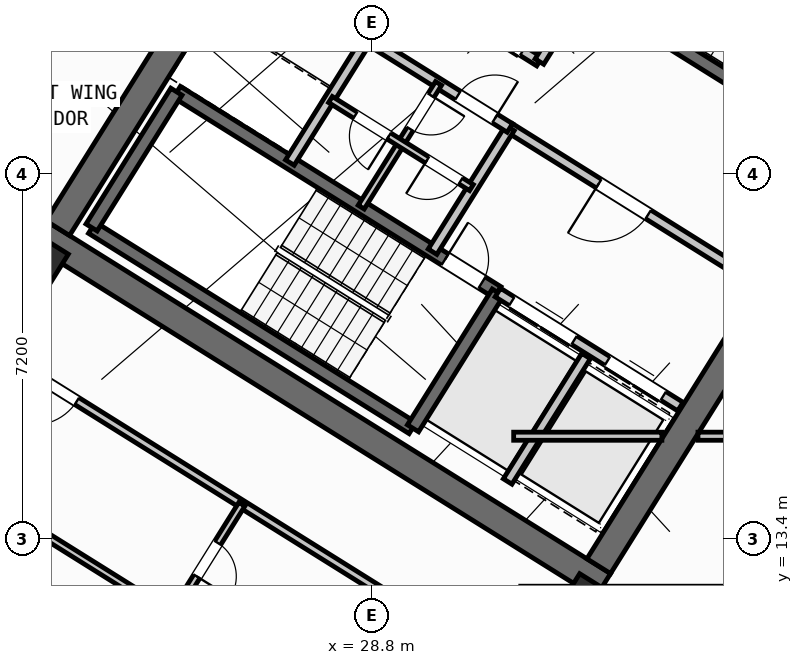
"""IFC4 building model, lengths in metres.
Left out: names, types, materials, properties, quantities, classifications, styles, units other than length and angle.
Written with IfcOpenShell. Run it as: python <this file> out.ifc"""

import sys

from ifc_helpers import new_model, si_unit, direction, frame, frame_2d, origin, origin_2d, place, context, subcontext, project, spatial, rectangle, hollow_rectangle, extrude, source, transform, mapped, element, fill, save


model = new_model("IFC4")
c1 = context("Model", 3, precision=1e-05, world=origin(), true_north=direction((0.0, 1.0)))
c2 = subcontext(c1, "Body", "Model", "MODEL_VIEW")
j1 = project(units=[si_unit("LENGTHUNIT", "METRE"), si_unit("PLANEANGLEUNIT", "RADIAN")], contexts=[c1])
p1 = place(None, origin())
s1 = spatial("IfcSite", under=j1, at=p1, CompositionType="ELEMENT")
p2 = place(p1, origin())
s2 = spatial("IfcBuilding", under=s1, at=p2, CompositionType="ELEMENT")
p3 = place(p2, frame((0.0, 0.0, 158.7)))
s3 = spatial("IfcBuildingStorey", under=s2, at=p3, CompositionType="ELEMENT", Elevation=158.7)
p4 = place(p3, frame((33.366, 12.477, 0.0), z_axis=(0.0, 0.0, 1.0), x_axis=(-0.848047359947, 0.529920442413, 0.0)))
e1 = element("IfcWall", 1, at=p4, inside=s3, PredefinedType="SHEAR", context=c2, shape_type="SweptSolid", body=[
    extrude(rectangle(XDim=13.14, YDim=0.55, at=frame_2d((6.57, 0.0))), origin(), (0.0, 0.0, 1.0), 3.35),
])
p5 = place(p3, frame((36.683, 18.304, 0.0), z_axis=(0.0, 0.0, 1.0), x_axis=(-0.529896466841, -0.848062341122, 0.0)))
e2 = element("IfcWall", 2, at=p5, inside=s3, PredefinedType="SHEAR", context=c2, shape_type="SweptSolid", body=[
    extrude(rectangle(XDim=6.425, YDim=0.55, at=frame_2d((3.212, 0.0))), origin(), (0.0, 0.0, 1.0), 3.35),
])
p6 = place(p3, frame((26.007, 24.976, 0.0), z_axis=(0.0, 0.0, 1.0), x_axis=(-0.529923795287, -0.848045264823, 0.0)))
e3 = element("IfcWall", 3, at=p6, inside=s3, PredefinedType="SHEAR", context=c2, shape_type="SweptSolid", body=[
    extrude(rectangle(XDim=6.425, YDim=0.55, at=frame_2d((3.212, 0.0))), origin(), (0.0, 0.0, 1.0), 3.35),
])
m1 = source(origin(), c2, "Body", "SweptSolid", [
    extrude(hollow_rectangle(XDim=0.9, YDim=0.9, WallThickness=0.036, at=origin_2d()), origin(), (0.0, 0.0, 1.0), 3.6),
])
for number, where, z_axis, x_axis in (
    (4, (33.046, 12.087, 0.0), (0.0, 0.0, 1.0), (-0.848, 0.53, 0.0)),
    (5, (22.191, 18.87, 0.0), (0.0, 0.0, 1.0), (-0.848, 0.53, 0.0)),
):
    element("IfcColumn", number, at=place(p3, frame(where, z_axis=z_axis, x_axis=x_axis)), inside=s3, PredefinedType="COLUMN", context=c2, shape_type="MappedRepresentation", body=[
        mapped(m1, transform((0.0, 0.0, 0.0), scale=1.0)),
    ])
p7 = place(p3, frame((29.268, 6.429, 0.0), z_axis=(0.0, 0.0, 1.0), x_axis=(-0.848049971435, 0.529916263149, 0.0)))
e6 = element("IfcWall", 6, at=p7, inside=s3, PredefinedType="STANDARD", context=c2, shape_type="SweptSolid", body=[
    extrude(rectangle(XDim=31.588, YDim=0.32, at=frame_2d((15.794, 0.0))), origin(), (0.0, 0.0, 1.0), 3.35),
])
p8 = place(p7, frame((16.362, 0.0, 0.0)))
e7 = element("IfcOpeningElement", 7, at=p8, cuts=e6, PredefinedType="OPENING", context=c2, shape_type="SweptSolid", body=[
    extrude(rectangle(XDim=1.2, YDim=2.15, at=frame_2d((0.6, 1.075))), frame((0.0, 0.17, 0.0), z_axis=(0.0, -1.0, 0.0), x_axis=(1.0, 0.0, 0.0)), (0.0, 0.0, 1.0), 0.34),
])
p9 = place(p7, frame((2.989, 0.0, 0.8)))
e8 = element("IfcOpeningElement", 8, at=p9, cuts=e6, PredefinedType="OPENING", context=c2, shape_type="SweptSolid", body=[
    extrude(rectangle(XDim=2.1, YDim=1.55, at=frame_2d((1.05, 0.775))), frame((0.0, 0.17, 0.0), z_axis=(0.0, -1.0, 0.0), x_axis=(1.0, 0.0, 0.0)), (0.0, 0.0, 1.0), 0.34),
])
p10 = place(p7, frame((8.359, 0.0, 0.8)))
e9 = element("IfcOpeningElement", 9, at=p10, cuts=e6, PredefinedType="OPENING", context=c2, shape_type="SweptSolid", body=[
    extrude(rectangle(XDim=2.1, YDim=1.55, at=frame_2d((1.05, 0.775))), frame((0.0, 0.17, 0.0), z_axis=(0.0, -1.0, 0.0), x_axis=(1.0, 0.0, 0.0)), (0.0, 0.0, 1.0), 0.34),
])
p11 = place(p7, frame((13.284, 0.0, 0.95)))
e10 = element("IfcOpeningElement", 10, at=p11, cuts=e6, PredefinedType="OPENING", context=c2, shape_type="SweptSolid", body=[
    extrude(rectangle(XDim=1.2, YDim=1.4, at=frame_2d((0.6, 0.7))), frame((0.0, 0.17, 0.0), z_axis=(0.0, -1.0, 0.0), x_axis=(1.0, 0.0, 0.0)), (0.0, 0.0, 1.0), 0.34),
])
p12 = place(p7, frame((20.259, 0.0, 0.95)))
e11 = element("IfcOpeningElement", 11, at=p12, cuts=e6, PredefinedType="OPENING", context=c2, shape_type="SweptSolid", body=[
    extrude(rectangle(XDim=1.2, YDim=1.4, at=frame_2d((0.6, 0.7))), frame((0.0, 0.17, 0.0), z_axis=(0.0, -1.0, 0.0), x_axis=(1.0, 0.0, 0.0)), (0.0, 0.0, 1.0), 0.34),
])
p13 = place(p7, frame((22.929, 0.0, 0.95)))
e12 = element("IfcOpeningElement", 12, at=p13, cuts=e6, PredefinedType="OPENING", context=c2, shape_type="SweptSolid", body=[
    extrude(rectangle(XDim=1.2, YDim=1.4, at=frame_2d((0.6, 0.7))), frame((0.0, 0.17, 0.0), z_axis=(0.0, -1.0, 0.0), x_axis=(1.0, 0.0, 0.0)), (0.0, 0.0, 1.0), 0.34),
])
p14 = place(p7, frame((27.481, 0.0, 0.8)))
e13 = element("IfcOpeningElement", 13, at=p14, cuts=e6, PredefinedType="OPENING", context=c2, shape_type="SweptSolid", body=[
    extrude(rectangle(XDim=2.1, YDim=1.55, at=frame_2d((1.05, 0.775))), frame((0.0, 0.17, 0.0), z_axis=(0.0, -1.0, 0.0), x_axis=(1.0, 0.0, 0.0)), (0.0, 0.0, 1.0), 0.34),
])
p15 = place(p3, frame((29.605, 15.581, 0.0), z_axis=(0.0, 0.0, 1.0), x_axis=(-0.848036911448, 0.529937163087, 0.0)))
e14 = element("IfcWall", 14, at=p15, inside=s3, PredefinedType="SHEAR", context=c2, shape_type="SweptSolid", body=[
    extrude(rectangle(XDim=7.46, YDim=0.26, at=frame_2d((3.73, 0.0))), origin(), (0.0, 0.0, 1.0), 3.35),
])
p16 = place(p3, frame((31.28, 18.261, 0.0), z_axis=(0.0, 0.0, 1.0), x_axis=(-0.848051618787, 0.529913626805, 0.0)))
e15 = element("IfcWall", 15, at=p16, inside=s3, PredefinedType="SHEAR", context=c2, shape_type="SweptSolid", body=[
    extrude(rectangle(XDim=7.46, YDim=0.26, at=frame_2d((3.73, 0.0))), origin(), (0.0, 0.0, 1.0), 3.35),
])
p17 = place(p16, frame((0.36, 0.0, 0.0)))
e16 = element("IfcOpeningElement", 16, at=p17, cuts=e15, PredefinedType="OPENING", context=c2, shape_type="SweptSolid", body=[
    extrude(rectangle(XDim=0.86, YDim=2.05, at=frame_2d((0.43, 1.025))), frame((0.0, 0.14, 0.0), z_axis=(0.0, -1.0, 0.0), x_axis=(1.0, 0.0, 0.0)), (0.0, 0.0, 1.0), 0.28),
])
p18 = place(p3, frame((31.288, 18.256, 0.0), z_axis=(0.0, 0.0, 1.0), x_axis=(-0.529943379326, -0.848033026897, 0.0)))
e17 = element("IfcWall", 17, at=p18, inside=s3, PredefinedType="SHEAR", context=c2, shape_type="SweptSolid", body=[
    extrude(rectangle(XDim=3.16, YDim=0.26, at=frame_2d((1.58, 0.0))), origin(), (0.0, 0.0, 1.0), 3.35),
])
p19 = place(p3, frame((24.945, 22.22, 0.0), z_axis=(0.0, 0.0, 1.0), x_axis=(-0.529908658664, -0.84805472316, 0.0)))
e18 = element("IfcWall", 18, at=p19, inside=s3, PredefinedType="SHEAR", context=c2, shape_type="SweptSolid", body=[
    extrude(rectangle(XDim=3.16, YDim=0.26, at=frame_2d((1.58, 0.0))), origin(), (0.0, 0.0, 1.0), 3.35),
])
p20 = place(p3, frame((38.046, 21.108, 0.0), z_axis=(0.0, 0.0, 1.0), x_axis=(-0.848054434086, 0.529909121291, 0.0)))
e19 = element("IfcWall", 19, at=p20, inside=s3, PredefinedType="SHEAR", context=c2, shape_type="SweptSolid", body=[
    extrude(rectangle(XDim=7.33, YDim=0.26, at=frame_2d((3.665, 0.0))), origin(), (0.0, 0.0, 1.0), 3.35),
])
p21 = place(p20, frame((0.22, 0.0, 0.0)))
e20 = element("IfcOpeningElement", 20, at=p21, cuts=e19, PredefinedType="OPENING", context=c2, shape_type="SweptSolid", body=[
    extrude(rectangle(XDim=1.1, YDim=2.1, at=frame_2d((0.55, 1.05))), frame((0.0, 0.14, 0.0), z_axis=(0.0, -1.0, 0.0), x_axis=(1.0, 0.0, 0.0)), (0.0, 0.0, 1.0), 0.28),
])
p22 = place(p3, frame((34.891, 16.005, 0.0), z_axis=(0.0, 0.0, 1.0), x_axis=(-0.848062873452, 0.529895614884, 0.0)))
e21 = element("IfcWall", 21, at=p22, inside=s3, PredefinedType="STANDARD", context=c2, shape_type="SweptSolid", body=[
    extrude(rectangle(XDim=4.248, YDim=0.2, at=frame_2d((2.124, 0.0))), origin(), (0.0, 0.0, 1.0), 3.34),
])
p23 = place(p22, frame((0.398, 0.0, 0.0)))
e22 = element("IfcOpeningElement", 22, at=p23, cuts=e21, PredefinedType="OPENING", context=c2, shape_type="SweptSolid", body=[
    extrude(rectangle(XDim=1.3, YDim=2.2, at=frame_2d((0.65, 1.1))), frame((0.0, 0.11, 0.0), z_axis=(0.0, -1.0, 0.0), x_axis=(1.0, 0.0, 0.0)), (0.0, 0.0, 1.0), 0.22),
])
p24 = place(p22, frame((2.473, 0.0, 0.0)))
e23 = element("IfcOpeningElement", 23, at=p24, cuts=e21, PredefinedType="OPENING", context=c2, shape_type="SweptSolid", body=[
    extrude(rectangle(XDim=1.45, YDim=2.25, at=frame_2d((0.725, 1.125))), frame((0.0, 0.11, 0.0), z_axis=(0.0, -1.0, 0.0), x_axis=(1.0, 0.0, 0.0)), (0.0, 0.0, 1.0), 0.22),
])
p25 = place(p3, frame((36.417, 18.447, 0.0), z_axis=(0.0, 0.0, 1.0), x_axis=(-0.848064879198, 0.529892404805, 0.0)))
e24 = element("IfcWall", 24, at=p25, inside=s3, PredefinedType="STANDARD", context=c2, shape_type="SweptSolid", body=[
    extrude(rectangle(XDim=5.768, YDim=0.2, at=frame_2d((2.884, 0.0))), origin(), (0.0, 0.0, 1.0), 3.34),
])
p26 = place(p25, frame((2.548, 0.0, 0.0)))
e25 = element("IfcOpeningElement", 25, at=p26, cuts=e24, PredefinedType="OPENING", context=c2, shape_type="SweptSolid", body=[
    extrude(rectangle(XDim=1.15, YDim=2.1, at=frame_2d((0.575, 1.05))), frame((0.0, 0.11, 0.0), z_axis=(0.0, -1.0, 0.0), x_axis=(1.0, 0.0, 0.0)), (0.0, 0.0, 1.0), 0.22),
])
p27 = place(p3, frame((32.108, 22.814, 0.0), z_axis=(0.0, 0.0, 1.0), x_axis=(-0.848042229521, 0.529928652696, 0.0)))
e26 = element("IfcWall", 26, at=p27, inside=s3, PredefinedType="STANDARD", context=c2, shape_type="SweptSolid", body=[
    extrude(rectangle(XDim=5.62, YDim=0.2, at=frame_2d((2.81, 0.0))), origin(), (0.0, 0.0, 1.0), 3.34),
])
p28 = place(p27, frame((0.39, 0.0, 0.0)))
e27 = element("IfcOpeningElement", 27, at=p28, cuts=e26, PredefinedType="OPENING", context=c2, shape_type="SweptSolid", body=[
    extrude(rectangle(XDim=1.1, YDim=2.15, at=frame_2d((0.55, 1.075))), frame((0.0, 0.11, 0.0), z_axis=(0.0, -1.0, 0.0), x_axis=(1.0, 0.0, 0.0)), (0.0, 0.0, 1.0), 0.22),
])
p29 = place(p27, frame((2.25, 0.0, 0.0)))
e28 = element("IfcOpeningElement", 28, at=p29, cuts=e26, PredefinedType="OPENING", context=c2, shape_type="SweptSolid", body=[
    extrude(rectangle(XDim=1.1, YDim=2.15, at=frame_2d((0.55, 1.075))), frame((0.0, 0.11, 0.0), z_axis=(0.0, -1.0, 0.0), x_axis=(1.0, 0.0, 0.0)), (0.0, 0.0, 1.0), 0.22),
])
p30 = place(p27, frame((4.11, 0.0, 0.0)))
e29 = element("IfcOpeningElement", 29, at=p30, cuts=e26, PredefinedType="OPENING", context=c2, shape_type="SweptSolid", body=[
    extrude(rectangle(XDim=1.1, YDim=2.15, at=frame_2d((0.55, 1.075))), frame((0.0, 0.11, 0.0), z_axis=(0.0, -1.0, 0.0), x_axis=(1.0, 0.0, 0.0)), (0.0, 0.0, 1.0), 0.22),
])
p31 = place(p3, frame((32.982, 24.213, 0.0), z_axis=(0.0, 0.0, 1.0), x_axis=(-0.529839334948, -0.84809803628, 0.0)))
e30 = element("IfcWall", 30, at=p31, inside=s3, PredefinedType="STANDARD", context=c2, shape_type="SweptSolid", body=[
    extrude(rectangle(XDim=1.65, YDim=0.2, at=frame_2d((0.825, 0.0))), origin(), (0.0, 0.0, 1.0), 3.34),
])
p32 = place(p3, frame((33.029, 17.003, 0.0), z_axis=(0.0, 0.0, 1.0), x_axis=(-0.529916267533, -0.848049968695, 0.0)))
e31 = element("IfcWall", 31, at=p32, inside=s3, PredefinedType="STANDARD", context=c2, shape_type="SweptSolid", body=[
    extrude(rectangle(XDim=2.92, YDim=0.2, at=frame_2d((1.46, 0.0))), origin(), (0.0, 0.0, 1.0), 3.34),
])
for number, where, z_axis, x_axis in (
    (32, (31.525, 21.504, 0.0), (0.0, 0.0, 1.0), (-0.53, -0.848, 0.0)),
    (33, (28.71, 23.263, 0.0), (0.0, 0.0, 1.0), (-0.53, -0.848, 0.0)),
):
    element("IfcWall", number, at=place(p3, frame(where, z_axis=z_axis, x_axis=x_axis)), inside=s3, PredefinedType="STANDARD", context=c2, shape_type="SweptSolid", body=[
        extrude(rectangle(XDim=2.88, YDim=0.2, at=frame_2d((1.44, 0.0))), origin(), (0.0, 0.0, 1.0), 3.34),
    ])
p33 = place(p3, frame((31.525, 21.504, 0.0), z_axis=(0.0, 0.0, 1.0), x_axis=(-0.848040211232, 0.529931882541, 0.0)))
e34 = element("IfcWall", 34, at=p33, inside=s3, PredefinedType="STANDARD", context=c2, shape_type="SweptSolid", body=[
    extrude(rectangle(XDim=6.218, YDim=0.2, at=frame_2d((3.109, 0.0))), origin(), (0.0, 0.0, 1.0), 3.34),
])
p34 = place(p33, frame((4.4, 0.0, 0.0)))
e35 = element("IfcOpeningElement", 35, at=p34, cuts=e34, PredefinedType="OPENING", context=c2, shape_type="SweptSolid", body=[
    extrude(rectangle(XDim=0.86, YDim=2.05, at=frame_2d((0.43, 1.025))), frame((0.0, 0.11, 0.0), z_axis=(0.0, -1.0, 0.0), x_axis=(1.0, 0.0, 0.0)), (0.0, 0.0, 1.0), 0.22),
])
p35 = place(p33, frame((0.35, 0.0, 0.0)))
e36 = element("IfcOpeningElement", 36, at=p35, cuts=e34, PredefinedType="OPENING", context=c2, shape_type="SweptSolid", body=[
    extrude(rectangle(XDim=0.86, YDim=2.05, at=frame_2d((0.43, 1.025))), frame((0.0, 0.11, 0.0), z_axis=(0.0, -1.0, 0.0), x_axis=(1.0, 0.0, 0.0)), (0.0, 0.0, 1.0), 0.22),
])
p36 = place(p3, frame((30.117, 22.384, 0.0), z_axis=(0.0, 0.0, 1.0), x_axis=(-0.529951914384, -0.848027693204, 0.0)))
e37 = element("IfcWall", 37, at=p36, inside=s3, PredefinedType="PLUMBINGWALL", context=c2, shape_type="SweptSolid", body=[
    extrude(rectangle(XDim=1.4, YDim=0.14, at=frame_2d((0.7, 0.0))), origin(), (0.0, 0.0, 1.0), 3.34),
])
p37 = place(p36, frame((0.28, 0.0, 0.0)))
e38 = element("IfcOpeningElement", 38, at=p37, cuts=e37, PredefinedType="OPENING", context=c2, shape_type="SweptSolid", body=[
    extrude(rectangle(XDim=0.78, YDim=2.05, at=frame_2d((0.39, 1.025))), frame((0.0, 0.08, 0.0), z_axis=(0.0, -1.0, 0.0), x_axis=(1.0, 0.0, 0.0)), (0.0, 0.0, 1.0), 0.16),
])
p38 = place(p3, frame((29.375, 21.196, 0.0), z_axis=(0.0, 0.0, 1.0), x_axis=(-0.529865479138, -0.848081702443, 0.0)))
e39 = element("IfcWall", 39, at=p38, inside=s3, PredefinedType="PLUMBINGWALL", context=c2, shape_type="SweptSolid", body=[
    extrude(rectangle(XDim=1.48, YDim=0.14, at=frame_2d((0.74, 0.0))), origin(), (0.0, 0.0, 1.0), 3.34),
])
p39 = place(p3, frame((30.766, 20.327, 0.0), z_axis=(0.0, 0.0, 1.0), x_axis=(-0.848052663127, 0.529911955482, 0.0)))
e40 = element("IfcWall", 40, at=p39, inside=s3, PredefinedType="PLUMBINGWALL", context=c2, shape_type="SweptSolid", body=[
    extrude(rectangle(XDim=3.28, YDim=0.14, at=frame_2d((1.64, 0.0))), origin(), (0.0, 0.0, 1.0), 3.34),
])
p40 = place(p39, frame((0.25, 0.0, 0.0)))
e41 = element("IfcOpeningElement", 41, at=p40, cuts=e40, PredefinedType="OPENING", context=c2, shape_type="SweptSolid", body=[
    extrude(rectangle(XDim=0.78, YDim=2.05, at=frame_2d((0.39, 1.025))), frame((0.0, 0.08, 0.0), z_axis=(0.0, -1.0, 0.0), x_axis=(1.0, 0.0, 0.0)), (0.0, 0.0, 1.0), 0.16),
])
p41 = place(p39, frame((1.92, 0.0, 0.0)))
e42 = element("IfcOpeningElement", 42, at=p41, cuts=e40, PredefinedType="OPENING", context=c2, shape_type="SweptSolid", body=[
    extrude(rectangle(XDim=0.78, YDim=2.05, at=frame_2d((0.39, 1.025))), frame((0.0, 0.08, 0.0), z_axis=(0.0, -1.0, 0.0), x_axis=(1.0, 0.0, 0.0)), (0.0, 0.0, 1.0), 0.16),
])
p42 = place(p3, frame((32.164, 10.374, 0.0), z_axis=(0.0, 0.0, 1.0), x_axis=(-0.848044107957, 0.529925646633, 0.0)))
e43 = element("IfcWall", 43, at=p42, inside=s3, PredefinedType="PARTITIONING", context=c2, shape_type="SweptSolid", body=[
    extrude(rectangle(XDim=15.57, YDim=0.16, at=frame_2d((7.785, 0.0))), origin(), (0.0, 0.0, 1.0), 3.34),
])
p43 = place(p42, frame((10.83, 0.0, 0.0)))
e44 = element("IfcOpeningElement", 44, at=p43, cuts=e43, PredefinedType="OPENING", context=c2, shape_type="SweptSolid", body=[
    extrude(rectangle(XDim=1.0, YDim=2.1, at=frame_2d((0.5, 1.05))), frame((0.0, 0.09, 0.0), z_axis=(0.0, -1.0, 0.0), x_axis=(1.0, 0.0, 0.0)), (0.0, 0.0, 1.0), 0.18),
])
p44 = place(p3, frame((29.72, 8.859, 0.0), z_axis=(0.0, 0.0, 1.0), x_axis=(-0.848049134363, 0.529917602752, 0.0)))
e45 = element("IfcWall", 45, at=p44, inside=s3, PredefinedType="PLUMBINGWALL", context=c2, shape_type="SweptSolid", body=[
    extrude(rectangle(XDim=14.3, YDim=0.14, at=frame_2d((7.15, 0.0))), origin(), (0.0, 0.0, 1.0), 3.34),
])
p45 = place(p44, frame((9.57, 0.0, 0.0)))
e46 = element("IfcOpeningElement", 46, at=p45, cuts=e45, PredefinedType="OPENING", context=c2, shape_type="SweptSolid", body=[
    extrude(rectangle(XDim=0.92, YDim=2.08, at=frame_2d((0.46, 1.04))), frame((0.0, 0.08, 0.0), z_axis=(0.0, -1.0, 0.0), x_axis=(1.0, 0.0, 0.0)), (0.0, 0.0, 1.0), 0.16),
])
p46 = place(p3, frame((26.237, 14.078, 0.0), z_axis=(0.0, 0.0, 1.0), x_axis=(-0.52995640672, -0.848024885824, 0.0)))
e47 = element("IfcWall", 47, at=p46, inside=s3, PredefinedType="PLUMBINGWALL", context=c2, shape_type="SweptSolid", body=[
    extrude(rectangle(XDim=2.58, YDim=0.14, at=frame_2d((1.29, 0.0))), origin(), (0.0, 0.0, 1.0), 3.34),
])
p47 = place(p46, frame((0.9, 0.0, 0.0)))
e48 = element("IfcOpeningElement", 48, at=p47, cuts=e47, PredefinedType="OPENING", context=c2, shape_type="SweptSolid", body=[
    extrude(rectangle(XDim=0.78, YDim=2.05, at=frame_2d((0.39, 1.025))), frame((0.0, 0.08, 0.0), z_axis=(0.0, -1.0, 0.0), x_axis=(1.0, 0.0, 0.0)), (0.0, 0.0, 1.0), 0.16),
])
p48 = place(p3, frame((31.6, 15.42, 0.0), z_axis=(0.0, 0.0, 1.0), x_axis=(1.0, 0.0, 0.0)))
e49 = element("IfcWall", 49, at=p48, inside=s3, PredefinedType="PARTITIONING", context=c2, shape_type="SweptSolid", body=[
    extrude(rectangle(XDim=2.925, YDim=0.16, at=frame_2d((1.462, 0.0))), origin(), (0.0, 0.0, 1.0), 3.34),
])
p49 = place(p3, frame((35.237, 15.42, 0.0), z_axis=(0.0, 0.0, 1.0), x_axis=(1.0, 0.0, 0.0)))
e50 = element("IfcWall", 50, at=p49, inside=s3, PredefinedType="PARTITIONING", context=c2, shape_type="SweptSolid", body=[
    extrude(rectangle(XDim=15.432, YDim=0.16, at=frame_2d((7.716, 0.0))), origin(), (0.0, 0.0, 1.0), 3.34),
])
p50 = place(p49, frame((0.969, 0.0, 0.0)))
e51 = element("IfcOpeningElement", 51, at=p50, cuts=e50, PredefinedType="OPENING", context=c2, shape_type="SweptSolid", body=[
    extrude(rectangle(XDim=1.0, YDim=2.1, at=frame_2d((0.5, 1.05))), frame((0.0, 0.09, 0.0), z_axis=(0.0, -1.0, 0.0), x_axis=(1.0, 0.0, 0.0)), (0.0, 0.0, 1.0), 0.18),
])
p51 = place(p49, frame((8.799, 0.0, 0.0)))
e52 = element("IfcOpeningElement", 52, at=p51, cuts=e50, PredefinedType="OPENING", context=c2, shape_type="SweptSolid", body=[
    extrude(rectangle(XDim=1.0, YDim=2.1, at=frame_2d((0.5, 1.05))), frame((0.0, 0.09, 0.0), z_axis=(0.0, -1.0, 0.0), x_axis=(1.0, 0.0, 0.0)), (0.0, 0.0, 1.0), 0.18),
])
m2 = source(origin(), c2, "Body", "SweptSolid", [
    extrude(rectangle(XDim=0.86, YDim=2.05, at=frame_2d((0.43, 1.025))), frame((0.0, 0.025, 0.0), z_axis=(0.0, -1.0, 0.0), x_axis=(1.0, 0.0, 0.0)), (0.0, 0.0, 1.0), 0.05),
])
p52 = place(p17, frame((0.86, 0.0, 0.0), z_axis=(0.0, 0.0, 1.0), x_axis=(-1.0, 0.0, 0.0)))
e53 = element("IfcDoor", 53, at=p52, inside=s3, OperationType="SINGLE_SWING_LEFT", PredefinedType="DOOR", context=c2, shape_type="MappedRepresentation", body=[
    mapped(m2, transform((0.0, 0.0, 0.0), scale=1.0)),
])
fill(e16, e53)
m3 = source(origin(), c2, "Body", "SweptSolid", [
    extrude(rectangle(XDim=1.15, YDim=2.1, at=frame_2d((0.575, 1.05))), frame((0.0, 0.025, 0.0), z_axis=(0.0, -1.0, 0.0), x_axis=(1.0, 0.0, 0.0)), (0.0, 0.0, 1.0), 0.05),
])
p53 = place(p26, origin())
e54 = element("IfcDoor", 54, at=p53, inside=s3, OperationType="SINGLE_SWING_RIGHT", PredefinedType="DOOR", context=c2, shape_type="MappedRepresentation", body=[
    mapped(m3, transform((0.0, 0.0, 0.0), scale=1.0)),
])
fill(e25, e54)
m4 = source(origin(), c2, "Body", "SweptSolid", [
    extrude(rectangle(XDim=1.3, YDim=2.2, at=frame_2d((0.65, 1.1))), frame((0.0, 0.025, 0.0), z_axis=(0.0, -1.0, 0.0), x_axis=(1.0, 0.0, 0.0)), (0.0, 0.0, 1.0), 0.05),
])
p54 = place(p23, origin())
e55 = element("IfcDoor", 55, at=p54, inside=s3, OperationType="DOUBLE_DOOR_SLIDING", PredefinedType="DOOR", context=c2, shape_type="MappedRepresentation", body=[
    mapped(m4, transform((0.0, 0.0, 0.0), scale=1.0)),
])
fill(e22, e55)
m5 = source(origin(), c2, "Body", "SweptSolid", [
    extrude(rectangle(XDim=1.45, YDim=2.25, at=frame_2d((0.725, 1.125))), frame((0.0, 0.025, 0.0), z_axis=(0.0, -1.0, 0.0), x_axis=(1.0, 0.0, 0.0)), (0.0, 0.0, 1.0), 0.05),
])
p55 = place(p24, origin())
e56 = element("IfcDoor", 56, at=p55, inside=s3, OperationType="DOUBLE_DOOR_SLIDING", PredefinedType="DOOR", context=c2, shape_type="MappedRepresentation", body=[
    mapped(m5, transform((0.0, 0.0, 0.0), scale=1.0)),
])
fill(e23, e56)
p56 = place(p35, frame((0.86, 0.0, 0.0), z_axis=(0.0, 0.0, 1.0), x_axis=(-1.0, 0.0, 0.0)))
e57 = element("IfcDoor", 57, at=p56, inside=s3, OperationType="SINGLE_SWING_RIGHT", PredefinedType="DOOR", context=c2, shape_type="MappedRepresentation", body=[
    mapped(m2, transform((0.0, 0.0, 0.0), scale=1.0)),
])
fill(e36, e57)
m6 = source(origin(), c2, "Body", "SweptSolid", [
    extrude(rectangle(XDim=0.78, YDim=2.05, at=frame_2d((0.39, 1.025))), frame((0.0, 0.025, 0.0), z_axis=(0.0, -1.0, 0.0), x_axis=(1.0, 0.0, 0.0)), (0.0, 0.0, 1.0), 0.05),
])
p57 = place(p37, origin())
e58 = element("IfcDoor", 58, at=p57, inside=s3, OperationType="SINGLE_SWING_LEFT", PredefinedType="DOOR", context=c2, shape_type="MappedRepresentation", body=[
    mapped(m6, transform((0.0, 0.0, 0.0), scale=1.0)),
])
fill(e38, e58)
p58 = place(p40, origin())
e59 = element("IfcDoor", 59, at=p58, inside=s3, OperationType="SINGLE_SWING_RIGHT", PredefinedType="DOOR", context=c2, shape_type="MappedRepresentation", body=[
    mapped(m6, transform((0.0, 0.0, 0.0), scale=1.0)),
])
fill(e41, e59)
p59 = place(p41, origin())
e60 = element("IfcDoor", 60, at=p59, inside=s3, OperationType="SINGLE_SWING_LEFT", PredefinedType="DOOR", context=c2, shape_type="MappedRepresentation", body=[
    mapped(m6, transform((0.0, 0.0, 0.0), scale=1.0)),
])
fill(e42, e60)
m7 = source(origin(), c2, "Body", "SweptSolid", [
    extrude(rectangle(XDim=1.0, YDim=2.1, at=frame_2d((0.5, 1.05))), frame((0.0, 0.025, 0.0), z_axis=(0.0, -1.0, 0.0), x_axis=(1.0, 0.0, 0.0)), (0.0, 0.0, 1.0), 0.05),
])
p60 = place(p43, origin())
e61 = element("IfcDoor", 61, at=p60, inside=s3, OperationType="SINGLE_SWING_RIGHT", PredefinedType="DOOR", context=c2, shape_type="MappedRepresentation", body=[
    mapped(m7, transform((0.0, 0.0, 0.0), scale=1.0)),
])
fill(e44, e61)
p61 = place(p47, origin())
e62 = element("IfcDoor", 62, at=p61, inside=s3, OperationType="SINGLE_SWING_RIGHT", PredefinedType="DOOR", context=c2, shape_type="MappedRepresentation", body=[
    mapped(m6, transform((0.0, 0.0, 0.0), scale=1.0)),
])
fill(e48, e62)
save(model, sys.argv[1])
